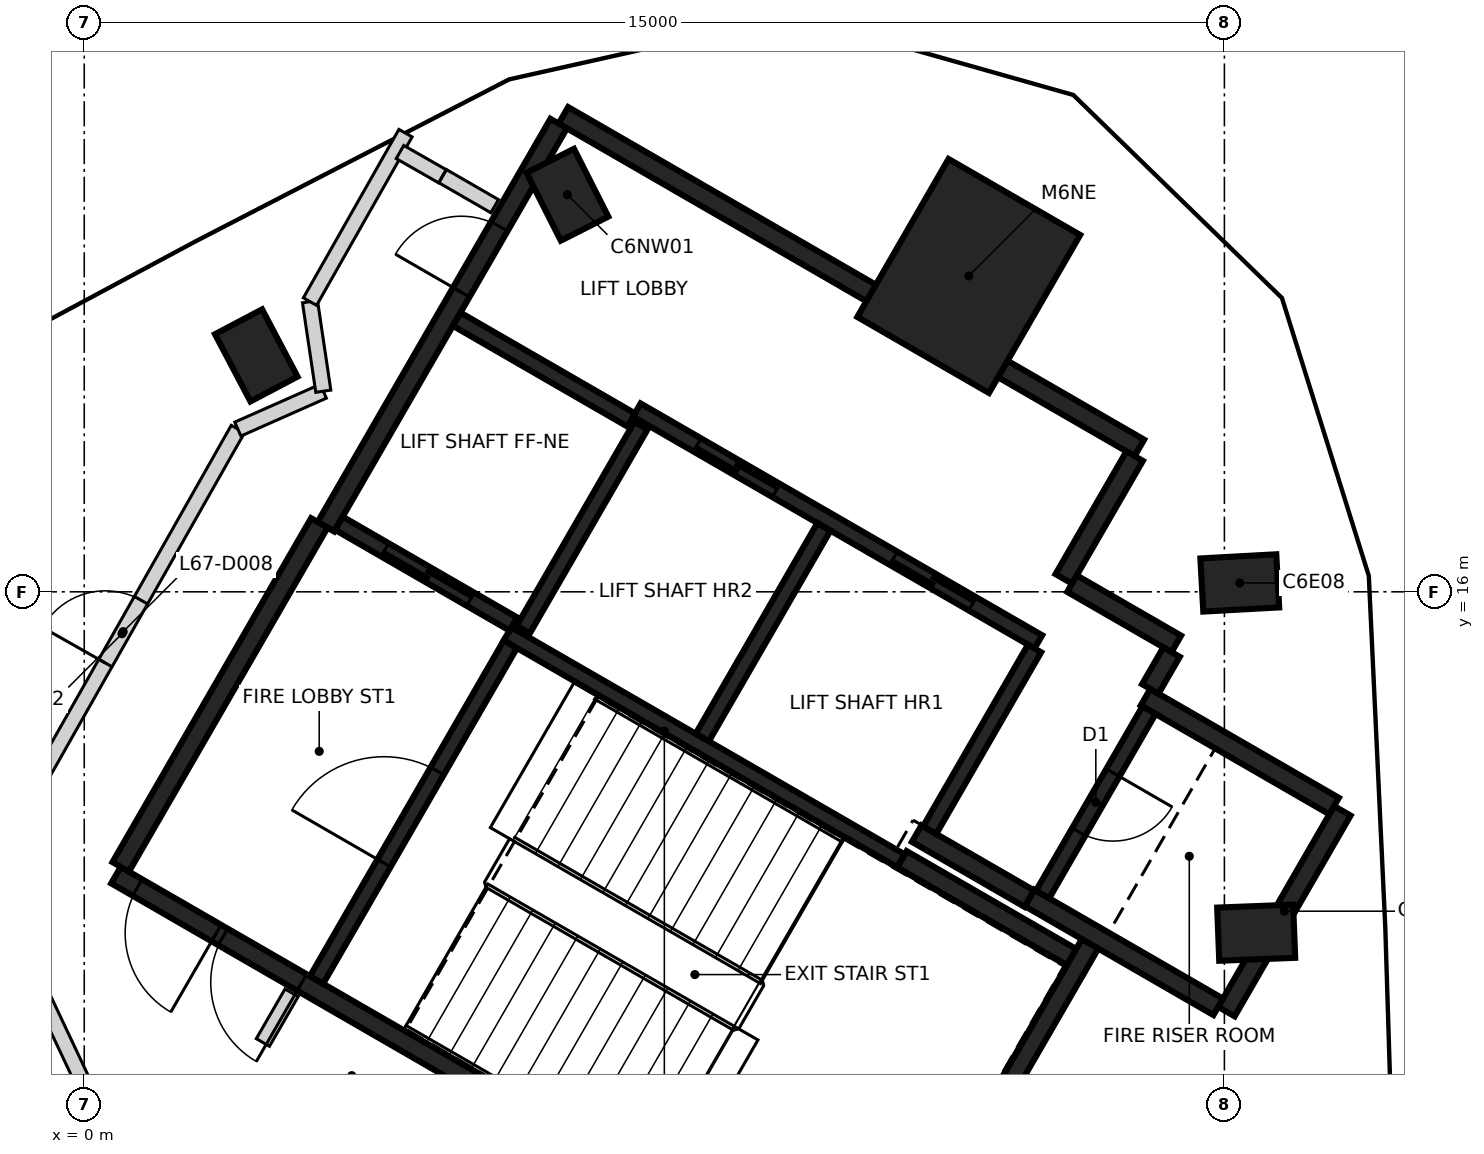
"""IFC4 building model, lengths in metres.
Left out: names, types, materials, properties, quantities, classifications, styles, units other than length and angle.
Written with IfcOpenShell. Run it as: python <this file> out.ifc"""

import sys

from ifc_helpers import new_model, si_unit, direction, frame, frame_2d, origin, origin_2d, place, context, subcontext, project, spatial, rectangle, extrude, element, fill, save


model = new_model("IFC4")
c1 = context("Model", 3, precision=1e-05, world=origin(), true_north=direction((0.0, 1.0)))
c2 = subcontext(c1, "Body", "Model", "MODEL_VIEW")
j1 = project(units=[si_unit("LENGTHUNIT", "METRE"), si_unit("PLANEANGLEUNIT", "RADIAN")], contexts=[c1])
p1 = place(None, origin())
s1 = spatial("IfcSite", under=j1, at=p1, CompositionType="ELEMENT")
p2 = place(p1, origin())
s2 = spatial("IfcBuilding", under=s1, at=p2, CompositionType="ELEMENT")
p3 = place(p2, frame((0.0, 0.0, 265.8)))
s3 = spatial("IfcBuildingStorey", under=s2, at=p3, CompositionType="ELEMENT", Elevation=265.8)
for number, where, z_axis, x_axis in (
    (1, (15.418, 11.515, -0.35), (0.0, 0.0, 1.0), (0.999, 0.039, 0.0)),
    (2, (15.202, 16.117, -0.35), (0.0, 0.0, 1.0), (0.998, 0.055, 0.0)),
    (3, (6.356, 21.224, -0.35), (0.0, 0.0, 1.0), (-0.452, 0.892, 0.0)),
    (4, (2.263, 19.11, -0.35), (0.0, 0.0, 1.0), (-0.466, 0.885, 0.0)),
):
    element("IfcColumn", number, at=place(p3, frame(where, z_axis=z_axis, x_axis=x_axis)), inside=s3, PredefinedType="COLUMN", context=c2, shape_type="SweptSolid", body=[
        extrude(rectangle(XDim=1.0, YDim=0.7, at=origin_2d()), origin(), (0.0, 0.0, 1.0), 3.6),
    ])
p4 = place(p3, frame((11.637, 20.155, -0.35), z_axis=(0.0, 0.0, 1.0), x_axis=(0.5, 0.866025403784, 0.0)))
e5 = element("IfcColumn", 5, at=p4, inside=s3, PredefinedType="COLUMN", context=c2, shape_type="SweptSolid", body=[
    extrude(rectangle(XDim=2.4, YDim=2.0, at=origin_2d()), origin(), (0.0, 0.0, 1.0), 3.6),
])
p5 = place(p3, frame((10.42, 6.498, 0.0), z_axis=(0.0, 0.0, 1.0), x_axis=(-0.866021906294, 0.500006057782, 0.0)))
e6 = element("IfcWall", 6, at=p5, inside=s3, PredefinedType="SHEAR", context=c2, shape_type="SweptSolid", body=[
    extrude(rectangle(XDim=11.55, YDim=0.25, at=frame_2d((5.775, 0.0))), origin(), (0.0, 0.0, 1.0), 3.25),
])
p6 = place(p5, frame((10.025, 0.0, 0.0)))
e7 = element("IfcOpeningElement", 7, at=p6, cuts=e6, PredefinedType="OPENING", context=c2, shape_type="SweptSolid", body=[
    extrude(rectangle(XDim=1.2, YDim=2.1, at=frame_2d((0.6, 1.05))), frame((0.0, 0.135, 0.0), z_axis=(0.0, -1.0, 0.0), x_axis=(1.0, 0.0, 0.0)), (0.0, 0.0, 1.0), 0.27),
])
p7 = place(p5, frame((8.725, 0.0, 0.0)))
e8 = element("IfcOpeningElement", 8, at=p7, cuts=e6, PredefinedType="OPENING", context=c2, shape_type="SweptSolid", body=[
    extrude(rectangle(XDim=1.2, YDim=2.1, at=frame_2d((0.6, 1.05))), frame((0.0, 0.135, 0.0), z_axis=(0.0, -1.0, 0.0), x_axis=(1.0, 0.0, 0.0)), (0.0, 0.0, 1.0), 0.27),
])
p8 = place(p3, frame((6.304, 22.269, 0.0), z_axis=(0.0, 0.0, 1.0), x_axis=(0.866022959057, -0.500004234368, 0.0)))
e9 = element("IfcWall", 9, at=p8, inside=s3, PredefinedType="SHEAR", context=c2, shape_type="SweptSolid", body=[
    extrude(rectangle(XDim=8.75, YDim=0.25, at=frame_2d((4.375, 0.0))), origin(), (0.0, 0.0, 1.0), 3.25),
])
p9 = place(p3, frame((3.179, 16.856, 0.0), z_axis=(0.0, 0.0, 1.0), x_axis=(0.500001955336, 0.866024274868, 0.0)))
e10 = element("IfcWall", 10, at=p9, inside=s3, PredefinedType="SHEAR", context=c2, shape_type="SweptSolid", body=[
    extrude(rectangle(XDim=6.125, YDim=0.25, at=frame_2d((3.062, 0.0))), origin(), (0.0, 0.0, 1.0), 3.25),
])
p10 = place(p9, frame((3.563, 0.0, 0.0)))
e11 = element("IfcOpeningElement", 11, at=p10, cuts=e10, PredefinedType="OPENING", context=c2, shape_type="SweptSolid", body=[
    extrude(rectangle(XDim=1.0, YDim=2.1, at=frame_2d((0.5, 1.05))), frame((0.0, 0.135, 0.0), z_axis=(0.0, -1.0, 0.0), x_axis=(1.0, 0.0, 0.0)), (0.0, 0.0, 1.0), 0.27),
])
p11 = place(p3, frame((0.48, 12.381, 0.0), z_axis=(0.0, 0.0, 1.0), x_axis=(0.49999885962, 0.866026062182, 0.0)))
e12 = element("IfcWall", 12, at=p11, inside=s3, PredefinedType="SHEAR", context=c2, shape_type="SweptSolid", body=[
    extrude(rectangle(XDim=5.225, YDim=0.25, at=frame_2d((2.612, 0.0))), origin(), (0.0, 0.0, 1.0), 3.25),
])
p12 = place(p3, frame((13.238, 11.378, 0.0), z_axis=(0.0, 0.0, 1.0), x_axis=(-0.500008851346, -0.866020293397, 0.0)))
e13 = element("IfcWall", 13, at=p12, inside=s3, PredefinedType="SHEAR", context=c2, shape_type="SweptSolid", body=[
    extrude(rectangle(XDim=5.51, YDim=0.25, at=frame_2d((2.755, 0.0))), origin(), (0.0, 0.0, 1.0), 3.25),
])
p13 = place(p3, frame((16.552, 13.119, 0.0), z_axis=(0.0, 0.0, 1.0), x_axis=(-0.499978833458, -0.866037623948, 0.0)))
e14 = element("IfcWall", 14, at=p13, inside=s3, PredefinedType="SHEAR", context=c2, shape_type="SweptSolid", body=[
    extrude(rectangle(XDim=3.05, YDim=0.25, at=frame_2d((1.525, 0.0))), origin(), (0.0, 0.0, 1.0), 3.25),
])
p14 = place(p3, frame((14.918, 10.54, 0.0), z_axis=(0.0, 0.0, 1.0), x_axis=(-0.866063538972, 0.499933942099, 0.0)))
e15 = element("IfcWall", 15, at=p14, inside=s3, PredefinedType="SHEAR", context=c2, shape_type="SweptSolid", body=[
    extrude(rectangle(XDim=2.865, YDim=0.25, at=frame_2d((1.432, 0.0))), origin(), (0.0, 0.0, 1.0), 3.25),
])
p15 = place(p3, frame((13.963, 14.614, 0.0), z_axis=(0.0, 0.0, 1.0), x_axis=(0.866042235819, -0.499970844928, 0.0)))
e16 = element("IfcWall", 16, at=p15, inside=s3, PredefinedType="SHEAR", context=c2, shape_type="SweptSolid", body=[
    extrude(rectangle(XDim=2.865, YDim=0.25, at=frame_2d((1.432, 0.0))), origin(), (0.0, 0.0, 1.0), 3.25),
])
p16 = place(p3, frame((10.757, 12.481, 0.0), z_axis=(0.0, 0.0, 1.0), x_axis=(0.866022940537, -0.500004266446, 0.0)))
e17 = element("IfcWall", 17, at=p16, inside=s3, PredefinedType="SHEAR", context=c2, shape_type="SweptSolid", body=[
    extrude(rectangle(XDim=2.575, YDim=0.25, at=frame_2d((1.287, 0.0))), origin(), (0.0, 0.0, 1.0), 3.25),
])
p17 = place(p3, frame((13.819, 17.785, 0.0), z_axis=(0.0, 0.0, 1.0), x_axis=(-0.500039802285, -0.866002422705, 0.0)))
e18 = element("IfcWall", 18, at=p17, inside=s3, PredefinedType="SHEAR", context=c2, shape_type="SweptSolid", body=[
    extrude(rectangle(XDim=1.865, YDim=0.25, at=frame_2d((0.932, 0.0))), origin(), (0.0, 0.0, 1.0), 3.25),
])
p18 = place(p3, frame((12.433, 11.964, 0.0), z_axis=(0.0, 0.0, 1.0), x_axis=(-0.866038183914, 0.499977863513, 0.0)))
e19 = element("IfcWall", 19, at=p18, inside=s3, PredefinedType="SHEAR", context=c2, shape_type="SweptSolid", body=[
    extrude(rectangle(XDim=1.71, YDim=0.25, at=frame_2d((0.855, 0.0))), origin(), (0.0, 0.0, 1.0), 3.25),
])
p19 = place(p3, frame((12.995, 16.108, 0.0), z_axis=(0.0, 0.0, 1.0), x_axis=(0.866044474677, -0.49996696679, 0.0)))
e20 = element("IfcWall", 20, at=p19, inside=s3, PredefinedType="SHEAR", context=c2, shape_type="SweptSolid", body=[
    extrude(rectangle(XDim=1.584, YDim=0.25, at=frame_2d((0.792, 0.0))), origin(), (0.0, 0.0, 1.0), 3.25),
])
p20 = place(p3, frame((14.305, 15.207, 0.0), z_axis=(0.0, 0.0, 1.0), x_axis=(-0.499848422343, -0.866112899501, 0.0)))
e21 = element("IfcWall", 21, at=p20, inside=s3, PredefinedType="SHEAR", context=c2, shape_type="SweptSolid", body=[
    extrude(rectangle(XDim=0.559, YDim=0.25, at=frame_2d((0.28, 0.0))), origin(), (0.0, 0.0, 1.0), 3.25),
])
p21 = place(p3, frame((12.552, 15.342, 0.0), z_axis=(0.0, 0.0, 1.0), x_axis=(-0.866030299012, 0.499991521122, 0.0)))
e22 = element("IfcWall", 22, at=p21, inside=s3, PredefinedType="SHEAR", context=c2, shape_type="SweptSolid", body=[
    extrude(rectangle(XDim=6.1, YDim=0.2, at=frame_2d((3.05, 0.0))), origin(), (0.0, 0.0, 1.0), 3.25),
])
p22 = place(p21, frame((1.0, 0.0, 0.0)))
e23 = element("IfcOpeningElement", 23, at=p22, cuts=e22, PredefinedType="OPENING", context=c2, shape_type="SweptSolid", body=[
    extrude(rectangle(XDim=1.2, YDim=2.1, at=frame_2d((0.6, 1.05))), frame((0.0, 0.11, 0.0), z_axis=(0.0, -1.0, 0.0), x_axis=(1.0, 0.0, 0.0)), (0.0, 0.0, 1.0), 0.22),
])
p23 = place(p21, frame((3.982, 0.0, 0.0)))
e24 = element("IfcOpeningElement", 24, at=p23, cuts=e22, PredefinedType="OPENING", context=c2, shape_type="SweptSolid", body=[
    extrude(rectangle(XDim=1.2, YDim=2.1, at=frame_2d((0.6, 1.05))), frame((0.0, 0.11, 0.0), z_axis=(0.0, -1.0, 0.0), x_axis=(1.0, 0.0, 0.0)), (0.0, 0.0, 1.0), 0.22),
])
p24 = place(p3, frame((10.743, 12.46, 0.0), z_axis=(0.0, 0.0, 1.0), x_axis=(-0.866018848283, 0.500011354289, 0.0)))
e25 = element("IfcWall", 25, at=p24, inside=s3, PredefinedType="SHEAR", context=c2, shape_type="SweptSolid", body=[
    extrude(rectangle(XDim=5.974, YDim=0.2, at=frame_2d((2.987, 0.0))), origin(), (0.0, 0.0, 1.0), 3.25),
])
p25 = place(p3, frame((3.057, 10.895, 0.0), z_axis=(0.0, 0.0, 1.0), x_axis=(0.500027839223, 0.866009330205, 0.0)))
e26 = element("IfcWall", 26, at=p25, inside=s3, PredefinedType="SHEAR", context=c2, shape_type="SweptSolid", body=[
    extrude(rectangle(XDim=5.098, YDim=0.2, at=frame_2d((2.549, 0.0))), origin(), (0.0, 0.0, 1.0), 3.25),
])
p26 = place(p25, frame((1.774, 0.0, 0.0)))
e27 = element("IfcOpeningElement", 27, at=p26, cuts=e26, PredefinedType="OPENING", context=c2, shape_type="SweptSolid", body=[
    extrude(rectangle(XDim=1.4, YDim=2.1, at=frame_2d((0.7, 1.05))), frame((0.0, 0.11, 0.0), z_axis=(0.0, -1.0, 0.0), x_axis=(1.0, 0.0, 0.0)), (0.0, 0.0, 1.0), 0.22),
])
p27 = place(p3, frame((8.132, 14.084, 0.0), z_axis=(0.0, 0.0, 1.0), x_axis=(0.500030834389, 0.86600760081, 0.0)))
e28 = element("IfcWall", 28, at=p27, inside=s3, PredefinedType="SHEAR", context=c2, shape_type="SweptSolid", body=[
    extrude(rectangle(XDim=3.198, YDim=0.2, at=frame_2d((1.599, 0.0))), origin(), (0.0, 0.0, 1.0), 3.25),
])
p28 = place(p3, frame((14.008, 14.442, 0.0), z_axis=(0.0, 0.0, 1.0), x_axis=(-0.499986818241, -0.866033014143, 0.0)))
e29 = element("IfcWall", 29, at=p28, inside=s3, PredefinedType="SHEAR", context=c2, shape_type="SweptSolid", body=[
    extrude(rectangle(XDim=2.798, YDim=0.2, at=frame_2d((1.399, 0.0))), origin(), (0.0, 0.0, 1.0), 3.25),
])
p29 = place(p28, frame((0.949, 0.0, 0.0)))
e30 = element("IfcOpeningElement", 30, at=p29, cuts=e29, PredefinedType="OPENING", context=c2, shape_type="SweptSolid", body=[
    extrude(rectangle(XDim=0.9, YDim=2.1, at=frame_2d((0.45, 1.05))), frame((0.0, 0.11, 0.0), z_axis=(0.0, -1.0, 0.0), x_axis=(1.0, 0.0, 0.0)), (0.0, 0.0, 1.0), 0.22),
])
p30 = place(p3, frame((12.502, 15.255, 0.0), z_axis=(0.0, 0.0, 1.0), x_axis=(-0.499965018551, -0.866045599391, 0.0)))
e31 = element("IfcWall", 31, at=p30, inside=s3, PredefinedType="SHEAR", context=c2, shape_type="SweptSolid", body=[
    extrude(rectangle(XDim=2.759, YDim=0.2, at=frame_2d((1.379, 0.0))), origin(), (0.0, 0.0, 1.0), 3.25),
])
p31 = place(p3, frame((7.324, 18.187, 0.0), z_axis=(0.0, 0.0, 1.0), x_axis=(-0.499967891604, -0.866043940782, 0.0)))
e32 = element("IfcWall", 32, at=p31, inside=s3, PredefinedType="SHEAR", context=c2, shape_type="SweptSolid", body=[
    extrude(rectangle(XDim=3.1, YDim=0.2, at=frame_2d((1.55, 0.0))), origin(), (0.0, 0.0, 1.0), 3.25),
])
p32 = place(p3, frame((5.646, 15.576, 0.0), z_axis=(0.0, 0.0, 1.0), x_axis=(-0.866018407898, 0.500012117035, 0.0)))
e33 = element("IfcWall", 33, at=p32, inside=s3, PredefinedType="SHEAR", context=c2, shape_type="SweptSolid", body=[
    extrude(rectangle(XDim=2.651, YDim=0.2, at=frame_2d((1.325, 0.0))), origin(), (0.0, 0.0, 1.0), 3.25),
])
p33 = place(p32, frame((0.652, 0.0, 0.0)))
e34 = element("IfcOpeningElement", 34, at=p33, cuts=e33, PredefinedType="OPENING", context=c2, shape_type="SweptSolid", body=[
    extrude(rectangle(XDim=1.3, YDim=2.1, at=frame_2d((0.65, 1.05))), frame((0.0, 0.11, 0.0), z_axis=(0.0, -1.0, 0.0), x_axis=(1.0, 0.0, 0.0)), (0.0, 0.0, 1.0), 0.22),
])
p34 = place(p3, frame((7.196, 18.26, 0.0), z_axis=(0.0, 0.0, 1.0), x_axis=(-0.866018407898, 0.500012117035, 0.0)))
e35 = element("IfcWall", 35, at=p34, inside=s3, PredefinedType="SHEAR", context=c2, shape_type="SweptSolid", body=[
    extrude(rectangle(XDim=2.651, YDim=0.2, at=frame_2d((1.325, 0.0))), origin(), (0.0, 0.0, 1.0), 3.25),
])
p35 = place(p3, frame((-1.06, 11.76, 0.0), z_axis=(0.0, 0.0, 1.0), x_axis=(0.426549824954, -0.904464066081, 0.0)))
e36 = element("IfcWall", 36, at=p35, inside=s3, PredefinedType="PARTITIONING", context=c2, shape_type="SweptSolid", body=[
    extrude(rectangle(XDim=5.747, YDim=0.2, at=frame_2d((2.873, 0.0))), origin(), (0.0, 0.0, 1.0), 3.25),
])
p36 = place(p3, frame((-1.027, 12.757, 0.0), z_axis=(0.0, 0.0, 1.0), x_axis=(0.492663063759, 0.870220147783, 0.0)))
e37 = element("IfcWall", 37, at=p36, inside=s3, PredefinedType="PARTITIONING", context=c2, shape_type="SweptSolid", body=[
    extrude(rectangle(XDim=6.187, YDim=0.2, at=frame_2d((3.094, 0.0))), origin(), (0.0, 0.0, 1.0), 3.25),
])
p37 = place(p36, frame((2.65, 0.0, 0.0)))
e38 = element("IfcOpeningElement", 38, at=p37, cuts=e37, PredefinedType="OPENING", context=c2, shape_type="SweptSolid", body=[
    extrude(rectangle(XDim=0.95, YDim=2.1, at=frame_2d((0.475, 1.05))), frame((0.0, 0.11, 0.0), z_axis=(0.0, -1.0, 0.0), x_axis=(1.0, 0.0, 0.0)), (0.0, 0.0, 1.0), 0.22),
])
p38 = place(p3, frame((2.021, 18.141, 0.0), z_axis=(0.0, 0.0, 1.0), x_axis=(0.914343087003, 0.404940389748, 0.0)))
e39 = element("IfcWall", 39, at=p38, inside=s3, PredefinedType="PARTITIONING", context=c2, shape_type="SweptSolid", body=[
    extrude(rectangle(XDim=1.229, YDim=0.2, at=frame_2d((0.615, 0.0))), origin(), (0.0, 0.0, 1.0), 3.25),
])
p39 = place(p3, frame((2.35, 10.071, 0.0), z_axis=(0.0, 0.0, 1.0), x_axis=(0.500309905322, 0.865846405916, 0.0)))
e40 = element("IfcWall", 40, at=p39, inside=s3, PredefinedType="PARTITIONING", context=c2, shape_type="SweptSolid", body=[
    extrude(rectangle(XDim=0.755, YDim=0.2, at=frame_2d((0.378, 0.0))), origin(), (0.0, 0.0, 1.0), 3.25),
])
p40 = place(p3, frame((2.97, 19.817, 0.0), z_axis=(0.0, 0.0, 1.0), x_axis=(0.146986994932, -0.989138424752, 0.0)))
e41 = element("IfcWall", 41, at=p40, inside=s3, PredefinedType="PARTITIONING", context=c2, shape_type="SweptSolid", body=[
    extrude(rectangle(XDim=1.191, YDim=0.2, at=frame_2d((0.595, 0.0))), origin(), (0.0, 0.0, 1.0), 2.35),
])
p41 = place(p3, frame((2.97, 19.818, 0.0), z_axis=(0.0, 0.0, 1.0), x_axis=(0.493215654548, 0.86990707441, 0.0)))
e42 = element("IfcWall", 42, at=p41, inside=s3, PredefinedType="PARTITIONING", context=c2, shape_type="SweptSolid", body=[
    extrude(rectangle(XDim=2.548, YDim=0.2, at=frame_2d((1.274, 0.0))), origin(), (0.0, 0.0, 1.0), 3.25),
])
p42 = place(p3, frame((4.154, 21.786, 0.0), z_axis=(0.0, 0.0, 1.0), x_axis=(0.868196374619, -0.496220772539, 0.0)))
e43 = element("IfcWall", 43, at=p42, inside=s3, PredefinedType="PARTITIONING", context=c2, shape_type="SweptSolid", body=[
    extrude(rectangle(XDim=0.643, YDim=0.2, at=frame_2d((0.321, 0.0))), origin(), (0.0, 0.0, 1.0), 3.25),
])
p43 = place(p3, frame((4.716, 21.468, 0.0), z_axis=(0.0, 0.0, 1.0), x_axis=(0.865912682783, -0.500195187698, 0.0)))
e44 = element("IfcWall", 44, at=p43, inside=s3, PredefinedType="PARTITIONING", context=c2, shape_type="SweptSolid", body=[
    extrude(rectangle(XDim=0.79, YDim=0.2, at=frame_2d((0.395, 0.0))), origin(), (0.0, 0.0, 1.0), 3.25),
])
p44 = place(p33, origin())
e45 = element("IfcDoor", 45, at=p44, inside=s3, OperationType="SLIDING_TO_RIGHT", PredefinedType="DOOR", context=c2, shape_type="SweptSolid", body=[
    extrude(rectangle(XDim=1.3, YDim=2.1, at=frame_2d((0.65, 1.05))), frame((0.0, 0.025, 0.0), z_axis=(0.0, -1.0, 0.0), x_axis=(1.0, 0.0, 0.0)), (0.0, 0.0, 1.0), 0.05),
])
fill(e34, e45)
p45 = place(p22, origin())
e46 = element("IfcDoor", 46, at=p45, inside=s3, OperationType="DOUBLE_DOOR_SLIDING", PredefinedType="DOOR", context=c2, shape_type="SweptSolid", body=[
    extrude(rectangle(XDim=1.2, YDim=2.1, at=frame_2d((0.6, 1.05))), frame((0.0, 0.025, 0.0), z_axis=(0.0, -1.0, 0.0), x_axis=(1.0, 0.0, 0.0)), (0.0, 0.0, 1.0), 0.05),
])
fill(e23, e46)
p46 = place(p23, origin())
e47 = element("IfcDoor", 47, at=p46, inside=s3, OperationType="DOUBLE_DOOR_SLIDING", PredefinedType="DOOR", context=c2, shape_type="SweptSolid", body=[
    extrude(rectangle(XDim=1.2, YDim=2.1, at=frame_2d((0.6, 1.05))), frame((0.0, 0.025, 0.0), z_axis=(0.0, -1.0, 0.0), x_axis=(1.0, 0.0, 0.0)), (0.0, 0.0, 1.0), 0.05),
])
fill(e24, e47)
p47 = place(p10, origin())
e48 = element("IfcDoor", 48, at=p47, inside=s3, OperationType="SINGLE_SWING_LEFT", PredefinedType="DOOR", context=c2, shape_type="SweptSolid", body=[
    extrude(rectangle(XDim=1.0, YDim=2.1, at=frame_2d((0.5, 1.05))), frame((0.0, 0.025, 0.0), z_axis=(0.0, -1.0, 0.0), x_axis=(1.0, 0.0, 0.0)), (0.0, 0.0, 1.0), 0.05),
])
fill(e11, e48)
p48 = place(p6, origin())
e49 = element("IfcDoor", 49, at=p48, inside=s3, OperationType="SINGLE_SWING_LEFT", PredefinedType="DOOR", context=c2, shape_type="SweptSolid", body=[
    extrude(rectangle(XDim=1.2, YDim=2.1, at=frame_2d((0.6, 1.05))), frame((0.0, 0.025, 0.0), z_axis=(0.0, -1.0, 0.0), x_axis=(1.0, 0.0, 0.0)), (0.0, 0.0, 1.0), 0.05),
])
fill(e7, e49)
p49 = place(p7, origin())
e50 = element("IfcDoor", 50, at=p49, inside=s3, OperationType="SINGLE_SWING_RIGHT", PredefinedType="DOOR", context=c2, shape_type="SweptSolid", body=[
    extrude(rectangle(XDim=1.2, YDim=2.1, at=frame_2d((0.6, 1.05))), frame((0.0, 0.025, 0.0), z_axis=(0.0, -1.0, 0.0), x_axis=(1.0, 0.0, 0.0)), (0.0, 0.0, 1.0), 0.05),
])
fill(e8, e50)
p50 = place(p26, origin())
e51 = element("IfcDoor", 51, at=p50, inside=s3, OperationType="SINGLE_SWING_RIGHT", PredefinedType="DOOR", context=c2, shape_type="SweptSolid", body=[
    extrude(rectangle(XDim=1.4, YDim=2.1, at=frame_2d((0.7, 1.05))), frame((0.0, 0.025, 0.0), z_axis=(0.0, -1.0, 0.0), x_axis=(1.0, 0.0, 0.0)), (0.0, 0.0, 1.0), 0.05),
])
fill(e27, e51)
p51 = place(p29, origin())
e52 = element("IfcDoor", 52, at=p51, inside=s3, OperationType="SINGLE_SWING_LEFT", PredefinedType="DOOR", context=c2, shape_type="SweptSolid", body=[
    extrude(rectangle(XDim=0.9, YDim=2.1, at=frame_2d((0.45, 1.05))), frame((0.0, 0.025, 0.0), z_axis=(0.0, -1.0, 0.0), x_axis=(1.0, 0.0, 0.0)), (0.0, 0.0, 1.0), 0.05),
])
fill(e30, e52)
p52 = place(p37, origin())
e53 = element("IfcDoor", 53, at=p52, inside=s3, OperationType="SINGLE_SWING_LEFT", PredefinedType="DOOR", context=c2, shape_type="SweptSolid", body=[
    extrude(rectangle(XDim=0.95, YDim=2.1, at=frame_2d((0.475, 1.05))), frame((0.0, 0.025, 0.0), z_axis=(0.0, -1.0, 0.0), x_axis=(1.0, 0.0, 0.0)), (0.0, 0.0, 1.0), 0.05),
])
fill(e38, e53)
save(model, sys.argv[1])
